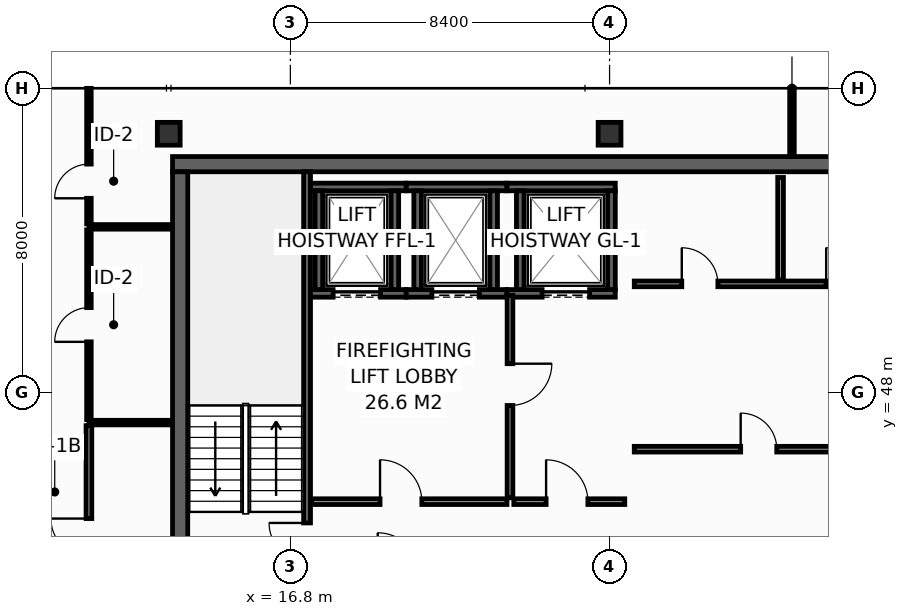
"""IFC4 building model, lengths in metres.
Left out: names, types, materials, properties, quantities, classifications, styles, units other than length and angle.
Written with IfcOpenShell. Run it as: python <this file> out.ifc"""

import sys

from ifc_helpers import new_model, si_unit, direction, frame, frame_2d, origin, origin_2d, place, context, subcontext, project, spatial, rectangle, hollow_rectangle, extrude, element, fill, save


model = new_model("IFC4")
c1 = context("Model", 3, precision=1e-05, world=origin(), true_north=direction((0.0, 1.0)))
c2 = subcontext(c1, "Body", "Model", "MODEL_VIEW")
j1 = project(units=[si_unit("LENGTHUNIT", "METRE"), si_unit("PLANEANGLEUNIT", "RADIAN")], contexts=[c1])
p1 = place(None, origin())
s1 = spatial("IfcSite", under=j1, at=p1, CompositionType="ELEMENT")
p2 = place(p1, origin())
s2 = spatial("IfcBuilding", under=s1, at=p2, CompositionType="ELEMENT")
p3 = place(p2, frame((0.0, 0.0, 291.4)))
s3 = spatial("IfcBuildingStorey", under=s2, at=p3, CompositionType="ELEMENT", Elevation=291.4)
p4 = place(p3, frame((13.7, 54.0, 0.0), z_axis=(0.0, 0.0, 1.0), x_axis=(1.0, 0.0, 0.0)))
e1 = element("IfcWall", 1, at=p4, inside=s3, PredefinedType="SHEAR", context=c2, shape_type="SweptSolid", body=[
    extrude(rectangle(XDim=32.5, YDim=0.4, at=frame_2d((16.25, 0.0))), origin(), (0.0, 0.0, 1.0), 3.55),
])
p5 = place(p3, frame((13.9, 43.4, 0.0), z_axis=(0.0, 0.0, 1.0), x_axis=(0.0, 1.0, 0.0)))
e2 = element("IfcWall", 2, at=p5, inside=s3, PredefinedType="SHEAR", context=c2, shape_type="SweptSolid", body=[
    extrude(rectangle(XDim=10.4, YDim=0.4, at=frame_2d((5.2, 0.0))), origin(), (0.0, 0.0, 1.0), 3.55),
])
for number, where, z_axis, x_axis in (
    (3, (13.6, 54.8, 0.0), (0.0, 0.0, 1.0), (1.0, 0.0, 0.0)),
    (4, (25.2, 54.8, 0.0), (0.0, 0.0, 1.0), (1.0, 0.0, 0.0)),
):
    element("IfcColumn", number, at=place(p3, frame(where, z_axis=z_axis, x_axis=x_axis)), inside=s3, PredefinedType="COLUMN", context=c2, shape_type="SweptSolid", body=[
        extrude(hollow_rectangle(XDim=0.6, YDim=0.6, WallThickness=0.028, at=origin_2d()), origin(), (0.0, 0.0, 1.0), 3.8),
    ])
p6 = place(p3, frame((17.33, 50.6, 0.0), z_axis=(0.0, 0.0, 1.0), x_axis=(1.0, 0.0, 0.0)))
e5 = element("IfcWall", 5, at=p6, inside=s3, PredefinedType="SHEAR", context=c2, shape_type="SweptSolid", body=[
    extrude(rectangle(XDim=2.52, YDim=0.2, at=frame_2d((1.26, 0.0))), origin(), (0.0, 0.0, 1.0), 3.55),
])
p7 = place(p6, frame((0.595, 0.0, 0.0)))
e6 = element("IfcOpeningElement", 6, at=p7, cuts=e5, PredefinedType="OPENING", context=c2, shape_type="SweptSolid", body=[
    extrude(rectangle(XDim=1.25, YDim=2.3, at=frame_2d((0.625, 1.15))), frame((0.0, 0.11, 0.0), z_axis=(0.0, -1.0, 0.0), x_axis=(1.0, 0.0, 0.0)), (0.0, 0.0, 1.0), 0.22),
])
p8 = place(p3, frame((17.33, 53.4, 0.0), z_axis=(0.0, 0.0, 1.0), x_axis=(1.0, 0.0, 0.0)))
e7 = element("IfcWall", 7, at=p8, inside=s3, PredefinedType="SHEAR", context=c2, shape_type="SweptSolid", body=[
    extrude(rectangle(XDim=2.52, YDim=0.2, at=frame_2d((1.26, 0.0))), origin(), (0.0, 0.0, 1.0), 3.55),
])
for number, where, z_axis, x_axis in (
    (8, (17.55, 50.7, 0.0), (0.0, 0.0, 1.0), (0.0, 1.0, 0.0)),
    (9, (19.55, 50.7, 0.0), (0.0, 0.0, 1.0), (0.0, 1.0, 0.0)),
):
    element("IfcWall", number, at=place(p3, frame(where, z_axis=z_axis, x_axis=x_axis)), inside=s3, PredefinedType="SHEAR", context=c2, shape_type="SweptSolid", body=[
        extrude(rectangle(XDim=2.6, YDim=0.2, at=frame_2d((1.3, 0.0))), origin(), (0.0, 0.0, 1.0), 3.55),
    ])
p9 = place(p3, frame((19.85, 50.6, 0.0), z_axis=(0.0, 0.0, 1.0), x_axis=(1.0, 0.0, 0.0)))
e10 = element("IfcWall", 10, at=p9, inside=s3, PredefinedType="SHEAR", context=c2, shape_type="SweptSolid", body=[
    extrude(rectangle(XDim=2.65, YDim=0.2, at=frame_2d((1.325, 0.0))), origin(), (0.0, 0.0, 1.0), 3.55),
])
p10 = place(p9, frame((0.675, 0.0, 0.0)))
e11 = element("IfcOpeningElement", 11, at=p10, cuts=e10, PredefinedType="OPENING", context=c2, shape_type="SweptSolid", body=[
    extrude(rectangle(XDim=1.25, YDim=2.3, at=frame_2d((0.625, 1.15))), frame((0.0, 0.11, 0.0), z_axis=(0.0, -1.0, 0.0), x_axis=(1.0, 0.0, 0.0)), (0.0, 0.0, 1.0), 0.22),
])
p11 = place(p3, frame((19.85, 53.4, 0.0), z_axis=(0.0, 0.0, 1.0), x_axis=(1.0, 0.0, 0.0)))
e12 = element("IfcWall", 12, at=p11, inside=s3, PredefinedType="SHEAR", context=c2, shape_type="SweptSolid", body=[
    extrude(rectangle(XDim=2.65, YDim=0.2, at=frame_2d((1.325, 0.0))), origin(), (0.0, 0.0, 1.0), 3.55),
])
for number, where, z_axis, x_axis in (
    (13, (20.15, 50.7, 0.0), (0.0, 0.0, 1.0), (0.0, 1.0, 0.0)),
    (14, (22.15, 50.7, 0.0), (0.0, 0.0, 1.0), (0.0, 1.0, 0.0)),
):
    element("IfcWall", number, at=place(p3, frame(where, z_axis=z_axis, x_axis=x_axis)), inside=s3, PredefinedType="SHEAR", context=c2, shape_type="SweptSolid", body=[
        extrude(rectangle(XDim=2.6, YDim=0.2, at=frame_2d((1.3, 0.0))), origin(), (0.0, 0.0, 1.0), 3.55),
    ])
p12 = place(p3, frame((22.5, 50.6, 0.0), z_axis=(0.0, 0.0, 1.0), x_axis=(1.0, 0.0, 0.0)))
e15 = element("IfcWall", 15, at=p12, inside=s3, PredefinedType="SHEAR", context=c2, shape_type="SweptSolid", body=[
    extrude(rectangle(XDim=2.85, YDim=0.2, at=frame_2d((1.425, 0.0))), origin(), (0.0, 0.0, 1.0), 3.55),
])
p13 = place(p12, frame((0.925, 0.0, 0.0)))
e16 = element("IfcOpeningElement", 16, at=p13, cuts=e15, PredefinedType="OPENING", context=c2, shape_type="SweptSolid", body=[
    extrude(rectangle(XDim=1.25, YDim=2.3, at=frame_2d((0.625, 1.15))), frame((0.0, 0.11, 0.0), z_axis=(0.0, -1.0, 0.0), x_axis=(1.0, 0.0, 0.0)), (0.0, 0.0, 1.0), 0.22),
])
p14 = place(p3, frame((22.5, 53.4, 0.0), z_axis=(0.0, 0.0, 1.0), x_axis=(1.0, 0.0, 0.0)))
e17 = element("IfcWall", 17, at=p14, inside=s3, PredefinedType="SHEAR", context=c2, shape_type="SweptSolid", body=[
    extrude(rectangle(XDim=2.85, YDim=0.2, at=frame_2d((1.425, 0.0))), origin(), (0.0, 0.0, 1.0), 3.55),
])
for number, where, z_axis, x_axis in (
    (18, (22.85, 50.7, 0.0), (0.0, 0.0, 1.0), (0.0, 1.0, 0.0)),
    (19, (25.25, 50.7, 0.0), (0.0, 0.0, 1.0), (0.0, 1.0, 0.0)),
):
    element("IfcWall", number, at=place(p3, frame(where, z_axis=z_axis, x_axis=x_axis)), inside=s3, PredefinedType="SHEAR", context=c2, shape_type="SweptSolid", body=[
        extrude(rectangle(XDim=2.6, YDim=0.2, at=frame_2d((1.3, 0.0))), origin(), (0.0, 0.0, 1.0), 3.55),
    ])
p15 = place(p3, frame((17.24, 43.4, 0.0), z_axis=(0.0, 0.0, 1.0), x_axis=(0.0, 1.0, 0.0)))
e20 = element("IfcWall", 20, at=p15, inside=s3, PredefinedType="SHEAR", context=c2, shape_type="SweptSolid", body=[
    extrude(rectangle(XDim=10.4, YDim=0.18, at=frame_2d((5.2, 0.0))), origin(), (0.0, 0.0, 1.0), 3.55),
])
p16 = place(p15, frame((0.16, 0.0, 0.0)))
e21 = element("IfcOpeningElement", 21, at=p16, cuts=e20, PredefinedType="OPENING", context=c2, shape_type="SweptSolid", body=[
    extrude(rectangle(XDim=1.0, YDim=2.15, at=frame_2d((0.5, 1.075))), frame((0.0, 0.1, 0.0), z_axis=(0.0, -1.0, 0.0), x_axis=(1.0, 0.0, 0.0)), (0.0, 0.0, 1.0), 0.2),
])
p17 = place(p3, frame((17.36, 45.12, 0.0), z_axis=(0.0, 0.0, 1.0), x_axis=(1.0, 0.0, 0.0)))
e22 = element("IfcWall", 22, at=p17, inside=s3, PredefinedType="PARTITIONING", context=c2, shape_type="SweptSolid", body=[
    extrude(rectangle(XDim=5.14, YDim=0.15, at=frame_2d((2.57, 0.0))), origin(), (0.0, 0.0, 1.0), 3.55),
])
p18 = place(p17, frame((1.8, 0.0, 0.0)))
e23 = element("IfcOpeningElement", 23, at=p18, cuts=e22, PredefinedType="OPENING", context=c2, shape_type="SweptSolid", body=[
    extrude(rectangle(XDim=1.1, YDim=2.15, at=frame_2d((0.55, 1.075))), frame((0.0, 0.085, 0.0), z_axis=(0.0, -1.0, 0.0), x_axis=(1.0, 0.0, 0.0)), (0.0, 0.0, 1.0), 0.17),
])
p19 = place(p3, frame((22.58, 50.55, 0.0), z_axis=(0.0, 0.0, 1.0), x_axis=(0.0, -1.0, 0.0)))
e24 = element("IfcWall", 24, at=p19, inside=s3, PredefinedType="PARTITIONING", context=c2, shape_type="SweptSolid", body=[
    extrude(rectangle(XDim=5.33, YDim=0.15, at=frame_2d((2.665, 0.0))), origin(), (0.0, 0.0, 1.0), 3.55),
])
p20 = place(p19, frame((1.8, 0.0, 0.0)))
e25 = element("IfcOpeningElement", 25, at=p20, cuts=e24, PredefinedType="OPENING", context=c2, shape_type="SweptSolid", body=[
    extrude(rectangle(XDim=1.1, YDim=2.15, at=frame_2d((0.55, 1.075))), frame((0.0, 0.085, 0.0), z_axis=(0.0, -1.0, 0.0), x_axis=(1.0, 0.0, 0.0)), (0.0, 0.0, 1.0), 0.17),
])
p21 = place(p3, frame((22.68, 45.12, 0.0), z_axis=(0.0, 0.0, 1.0), x_axis=(1.0, 0.0, 0.0)))
e26 = element("IfcWall", 26, at=p21, inside=s3, PredefinedType="PARTITIONING", context=c2, shape_type="SweptSolid", body=[
    extrude(rectangle(XDim=2.92, YDim=0.15, at=frame_2d((1.46, 0.0))), origin(), (0.0, 0.0, 1.0), 3.55),
])
p22 = place(p21, frame((0.85, 0.0, 0.0)))
e27 = element("IfcOpeningElement", 27, at=p22, cuts=e26, PredefinedType="OPENING", context=c2, shape_type="SweptSolid", body=[
    extrude(rectangle(XDim=1.1, YDim=2.15, at=frame_2d((0.55, 1.075))), frame((0.0, 0.085, 0.0), z_axis=(0.0, -1.0, 0.0), x_axis=(1.0, 0.0, 0.0)), (0.0, 0.0, 1.0), 0.17),
])
p23 = place(p3, frame((25.85, 50.85, 0.0), z_axis=(0.0, 0.0, 1.0), x_axis=(1.0, 0.0, 0.0)))
e28 = element("IfcWall", 28, at=p23, inside=s3, PredefinedType="PARTITIONING", context=c2, shape_type="SweptSolid", body=[
    extrude(rectangle(XDim=7.65, YDim=0.15, at=frame_2d((3.825, 0.0))), origin(), (0.0, 0.0, 1.0), 3.55),
])
p24 = place(p23, frame((1.25, 0.0, 0.0)))
e29 = element("IfcOpeningElement", 29, at=p24, cuts=e28, PredefinedType="OPENING", context=c2, shape_type="SweptSolid", body=[
    extrude(rectangle(XDim=0.95, YDim=2.15, at=frame_2d((0.475, 1.075))), frame((0.0, 0.085, 0.0), z_axis=(0.0, -1.0, 0.0), x_axis=(1.0, 0.0, 0.0)), (0.0, 0.0, 1.0), 0.17),
])
p25 = place(p23, frame((5.05, 0.0, 0.0)))
e30 = element("IfcOpeningElement", 30, at=p25, cuts=e28, PredefinedType="OPENING", context=c2, shape_type="SweptSolid", body=[
    extrude(rectangle(XDim=0.95, YDim=2.15, at=frame_2d((0.475, 1.075))), frame((0.0, 0.085, 0.0), z_axis=(0.0, -1.0, 0.0), x_axis=(1.0, 0.0, 0.0)), (0.0, 0.0, 1.0), 0.17),
])
p26 = place(p3, frame((29.7, 50.95, 0.0), z_axis=(0.0, 0.0, 1.0), x_axis=(0.0, 1.0, 0.0)))
e31 = element("IfcWall", 31, at=p26, inside=s3, PredefinedType="PARTITIONING", context=c2, shape_type="SweptSolid", body=[
    extrude(rectangle(XDim=2.7, YDim=0.15, at=frame_2d((1.35, 0.0))), origin(), (0.0, 0.0, 1.0), 3.55),
])
p27 = place(p3, frame((25.85, 46.5, 0.0), z_axis=(0.0, 0.0, 1.0), x_axis=(1.0, 0.0, 0.0)))
e32 = element("IfcWall", 32, at=p27, inside=s3, PredefinedType="PARTITIONING", context=c2, shape_type="SweptSolid", body=[
    extrude(rectangle(XDim=7.65, YDim=0.15, at=frame_2d((3.825, 0.0))), origin(), (0.0, 0.0, 1.0), 3.55),
])
p28 = place(p27, frame((2.8, 0.0, 0.0)))
e33 = element("IfcOpeningElement", 33, at=p28, cuts=e32, PredefinedType="OPENING", context=c2, shape_type="SweptSolid", body=[
    extrude(rectangle(XDim=0.95, YDim=2.15, at=frame_2d((0.475, 1.075))), frame((0.0, 0.085, 0.0), z_axis=(0.0, -1.0, 0.0), x_axis=(1.0, 0.0, 0.0)), (0.0, 0.0, 1.0), 0.17),
])
p29 = place(p3, frame((11.5, 52.35, 0.0), z_axis=(0.0, 0.0, 1.0), x_axis=(1.0, 0.0, 0.0)))
e34 = element("IfcWall", 34, at=p29, inside=s3, PredefinedType="PARTITIONING", context=c2, shape_type="SweptSolid", body=[
    extrude(rectangle(XDim=2.18, YDim=0.12, at=frame_2d((1.09, 0.0))), origin(), (0.0, 0.0, 1.0), 3.55),
])
p30 = place(p3, frame((30.0, 54.22, 0.0), z_axis=(0.0, 0.0, 1.0), x_axis=(0.0, 1.0, 0.0)))
e35 = element("IfcWall", 35, at=p30, inside=s3, PredefinedType="PARTITIONING", context=c2, shape_type="SweptSolid", body=[
    extrude(rectangle(XDim=1.775, YDim=0.12, at=frame_2d((0.888, 0.0))), origin(), (0.0, 0.0, 1.0), 2.935),
])
p31 = place(p3, frame((11.5, 52.43, 0.0), z_axis=(0.0, 0.0, 1.0), x_axis=(0.0, 1.0, 0.0)))
e36 = element("IfcWall", 36, at=p31, inside=s3, PredefinedType="PARTITIONING", context=c2, shape_type="SweptSolid", body=[
    extrude(rectangle(XDim=3.565, YDim=0.12, at=frame_2d((1.783, 0.0))), origin(), (0.0, 0.0, 1.0), 2.935),
])
p32 = place(p31, frame((0.672, 0.0, 0.0)))
e37 = element("IfcOpeningElement", 37, at=p32, cuts=e36, PredefinedType="OPENING", context=c2, shape_type="SweptSolid", body=[
    extrude(rectangle(XDim=0.9, YDim=2.1, at=frame_2d((0.45, 1.05))), frame((0.0, 0.07, 0.0), z_axis=(0.0, -1.0, 0.0), x_axis=(1.0, 0.0, 0.0)), (0.0, 0.0, 1.0), 0.14),
])
p33 = place(p3, frame((11.5, 47.2, 0.0), z_axis=(0.0, 0.0, 1.0), x_axis=(1.0, 0.0, 0.0)))
e38 = element("IfcWall", 38, at=p33, inside=s3, PredefinedType="PARTITIONING", context=c2, shape_type="SweptSolid", body=[
    extrude(rectangle(XDim=2.18, YDim=0.12, at=frame_2d((1.09, 0.0))), origin(), (0.0, 0.0, 1.0), 3.55),
])
p34 = place(p3, frame((11.5, 41.23, 0.0), z_axis=(0.0, 0.0, 1.0), x_axis=(0.0, 1.0, 0.0)))
e39 = element("IfcWall", 39, at=p34, inside=s3, PredefinedType="PARTITIONING", context=c2, shape_type="SweptSolid", body=[
    extrude(rectangle(XDim=5.89, YDim=0.15, at=frame_2d((2.945, 0.0))), origin(), (0.0, 0.0, 1.0), 2.947),
])
p35 = place(p34, frame((2.445, 0.0, 0.0)))
e40 = element("IfcOpeningElement", 40, at=p35, cuts=e39, PredefinedType="OPENING", context=c2, shape_type="SweptSolid", body=[
    extrude(rectangle(XDim=1.0, YDim=2.15, at=frame_2d((0.5, 1.075))), frame((0.0, 0.085, 0.0), z_axis=(0.0, -1.0, 0.0), x_axis=(1.0, 0.0, 0.0)), (0.0, 0.0, 1.0), 0.17),
])
p36 = place(p3, frame((11.5, 47.28, 0.0), z_axis=(0.0, 0.0, 1.0), x_axis=(0.0, 1.0, 0.0)))
e41 = element("IfcWall", 41, at=p36, inside=s3, PredefinedType="PARTITIONING", context=c2, shape_type="SweptSolid", body=[
    extrude(rectangle(XDim=4.99, YDim=0.12, at=frame_2d((2.495, 0.0))), origin(), (0.0, 0.0, 1.0), 3.55),
])
p37 = place(p36, frame((2.045, 0.0, 0.0)))
e42 = element("IfcOpeningElement", 42, at=p37, cuts=e41, PredefinedType="OPENING", context=c2, shape_type="SweptSolid", body=[
    extrude(rectangle(XDim=0.9, YDim=2.1, at=frame_2d((0.45, 1.05))), frame((0.0, 0.07, 0.0), z_axis=(0.0, -1.0, 0.0), x_axis=(1.0, 0.0, 0.0)), (0.0, 0.0, 1.0), 0.14),
])
p38 = place(p7, origin())
e43 = element("IfcDoor", 43, at=p38, inside=s3, OperationType="SLIDING_TO_LEFT", PredefinedType="DOOR", context=c2, shape_type="SweptSolid", body=[
    extrude(rectangle(XDim=1.25, YDim=2.3, at=frame_2d((0.625, 1.15))), frame((0.0, 0.025, 0.0), z_axis=(0.0, -1.0, 0.0), x_axis=(1.0, 0.0, 0.0)), (0.0, 0.0, 1.0), 0.05),
])
fill(e6, e43)
p39 = place(p10, origin())
e44 = element("IfcDoor", 44, at=p39, inside=s3, OperationType="SLIDING_TO_LEFT", PredefinedType="DOOR", context=c2, shape_type="SweptSolid", body=[
    extrude(rectangle(XDim=1.25, YDim=2.3, at=frame_2d((0.625, 1.15))), frame((0.0, 0.025, 0.0), z_axis=(0.0, -1.0, 0.0), x_axis=(1.0, 0.0, 0.0)), (0.0, 0.0, 1.0), 0.05),
])
fill(e11, e44)
p40 = place(p13, origin())
e45 = element("IfcDoor", 45, at=p40, inside=s3, OperationType="SLIDING_TO_LEFT", PredefinedType="DOOR", context=c2, shape_type="SweptSolid", body=[
    extrude(rectangle(XDim=1.25, YDim=2.3, at=frame_2d((0.625, 1.15))), frame((0.0, 0.025, 0.0), z_axis=(0.0, -1.0, 0.0), x_axis=(1.0, 0.0, 0.0)), (0.0, 0.0, 1.0), 0.05),
])
fill(e16, e45)
p41 = place(p16, origin())
e46 = element("IfcDoor", 46, at=p41, inside=s3, OperationType="SINGLE_SWING_RIGHT", PredefinedType="DOOR", context=c2, shape_type="SweptSolid", body=[
    extrude(rectangle(XDim=1.0, YDim=2.15, at=frame_2d((0.5, 1.075))), frame((0.0, 0.025, 0.0), z_axis=(0.0, -1.0, 0.0), x_axis=(1.0, 0.0, 0.0)), (0.0, 0.0, 1.0), 0.05),
])
fill(e21, e46)
p42 = place(p18, origin())
e47 = element("IfcDoor", 47, at=p42, inside=s3, OperationType="SINGLE_SWING_LEFT", PredefinedType="DOOR", context=c2, shape_type="SweptSolid", body=[
    extrude(rectangle(XDim=1.1, YDim=2.15, at=frame_2d((0.55, 1.075))), frame((0.0, 0.025, 0.0), z_axis=(0.0, -1.0, 0.0), x_axis=(1.0, 0.0, 0.0)), (0.0, 0.0, 1.0), 0.05),
])
fill(e23, e47)
p43 = place(p20, origin())
e48 = element("IfcDoor", 48, at=p43, inside=s3, OperationType="SINGLE_SWING_LEFT", PredefinedType="DOOR", context=c2, shape_type="SweptSolid", body=[
    extrude(rectangle(XDim=1.1, YDim=2.15, at=frame_2d((0.55, 1.075))), frame((0.0, 0.025, 0.0), z_axis=(0.0, -1.0, 0.0), x_axis=(1.0, 0.0, 0.0)), (0.0, 0.0, 1.0), 0.05),
])
fill(e25, e48)
p44 = place(p22, origin())
e49 = element("IfcDoor", 49, at=p44, inside=s3, OperationType="SINGLE_SWING_LEFT", PredefinedType="DOOR", context=c2, shape_type="SweptSolid", body=[
    extrude(rectangle(XDim=1.1, YDim=2.15, at=frame_2d((0.55, 1.075))), frame((0.0, 0.025, 0.0), z_axis=(0.0, -1.0, 0.0), x_axis=(1.0, 0.0, 0.0)), (0.0, 0.0, 1.0), 0.05),
])
fill(e27, e49)
p45 = place(p24, origin())
e50 = element("IfcDoor", 50, at=p45, inside=s3, OperationType="SINGLE_SWING_LEFT", PredefinedType="DOOR", context=c2, shape_type="SweptSolid", body=[
    extrude(rectangle(XDim=0.95, YDim=2.15, at=frame_2d((0.475, 1.075))), frame((0.0, 0.025, 0.0), z_axis=(0.0, -1.0, 0.0), x_axis=(1.0, 0.0, 0.0)), (0.0, 0.0, 1.0), 0.05),
])
fill(e29, e50)
p46 = place(p25, origin())
e51 = element("IfcDoor", 51, at=p46, inside=s3, OperationType="SINGLE_SWING_LEFT", PredefinedType="DOOR", context=c2, shape_type="SweptSolid", body=[
    extrude(rectangle(XDim=0.95, YDim=2.15, at=frame_2d((0.475, 1.075))), frame((0.0, 0.025, 0.0), z_axis=(0.0, -1.0, 0.0), x_axis=(1.0, 0.0, 0.0)), (0.0, 0.0, 1.0), 0.05),
])
fill(e30, e51)
p47 = place(p28, origin())
e52 = element("IfcDoor", 52, at=p47, inside=s3, OperationType="SINGLE_SWING_LEFT", PredefinedType="DOOR", context=c2, shape_type="SweptSolid", body=[
    extrude(rectangle(XDim=0.95, YDim=2.15, at=frame_2d((0.475, 1.075))), frame((0.0, 0.025, 0.0), z_axis=(0.0, -1.0, 0.0), x_axis=(1.0, 0.0, 0.0)), (0.0, 0.0, 1.0), 0.05),
])
fill(e33, e52)
p48 = place(p32, origin())
e53 = element("IfcDoor", 53, at=p48, inside=s3, OperationType="SINGLE_SWING_LEFT", PredefinedType="DOOR", context=c2, shape_type="SweptSolid", body=[
    extrude(rectangle(XDim=0.9, YDim=2.1, at=frame_2d((0.45, 1.05))), frame((0.0, 0.025, 0.0), z_axis=(0.0, -1.0, 0.0), x_axis=(1.0, 0.0, 0.0)), (0.0, 0.0, 1.0), 0.05),
])
fill(e37, e53)
p49 = place(p35, origin())
e54 = element("IfcDoor", 54, at=p49, inside=s3, OperationType="SINGLE_SWING_RIGHT", PredefinedType="DOOR", context=c2, shape_type="SweptSolid", body=[
    extrude(rectangle(XDim=1.0, YDim=2.15, at=frame_2d((0.5, 1.075))), frame((0.0, 0.025, 0.0), z_axis=(0.0, -1.0, 0.0), x_axis=(1.0, 0.0, 0.0)), (0.0, 0.0, 1.0), 0.05),
])
fill(e40, e54)
p50 = place(p37, origin())
e55 = element("IfcDoor", 55, at=p50, inside=s3, OperationType="SINGLE_SWING_LEFT", PredefinedType="DOOR", context=c2, shape_type="SweptSolid", body=[
    extrude(rectangle(XDim=0.9, YDim=2.1, at=frame_2d((0.45, 1.05))), frame((0.0, 0.025, 0.0), z_axis=(0.0, -1.0, 0.0), x_axis=(1.0, 0.0, 0.0)), (0.0, 0.0, 1.0), 0.05),
])
fill(e42, e55)
save(model, sys.argv[1])
